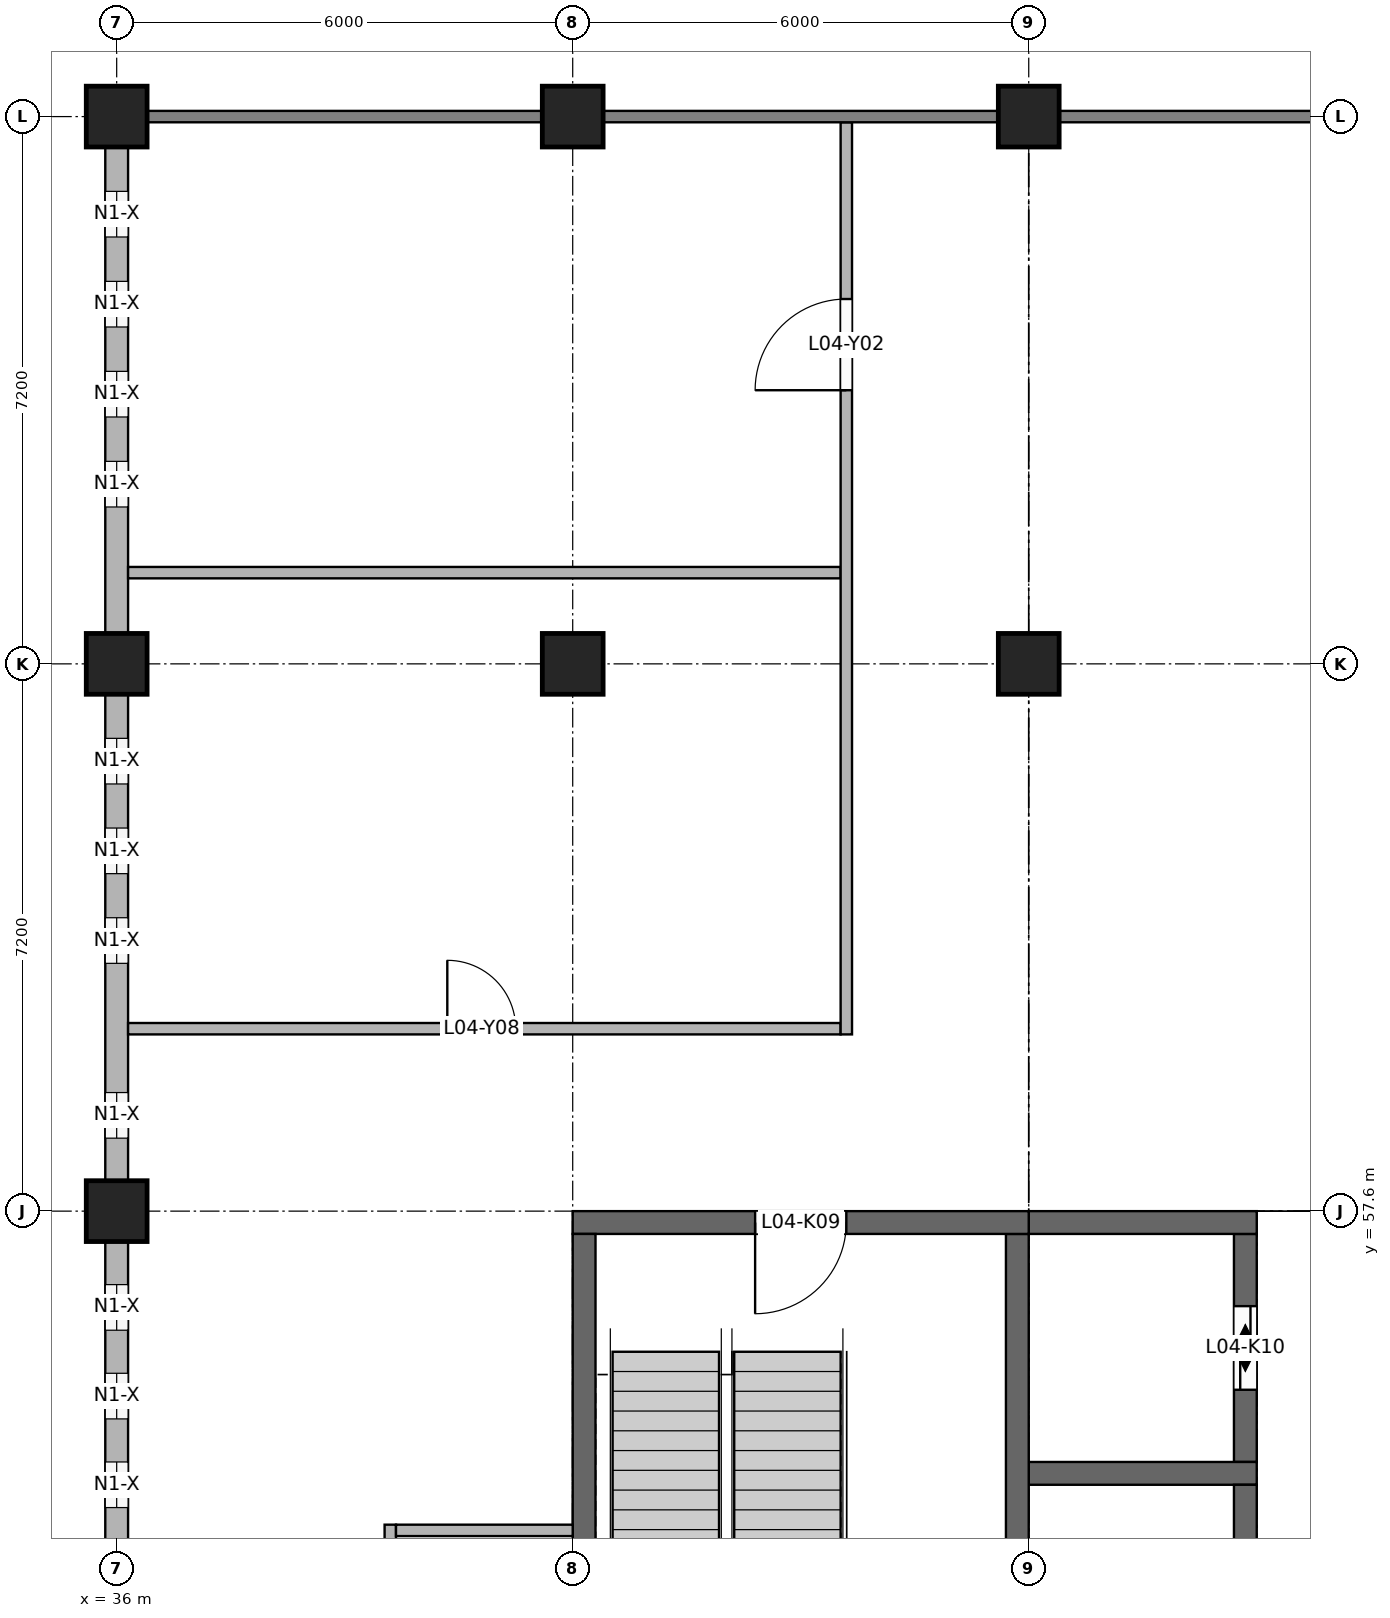
"""IFC4 building model, lengths in metres.
Left out: names, types, materials, properties, quantities, classifications, styles, units other than length and angle.
Written with IfcOpenShell. Run it as: python <this file> out.ifc"""

import sys

from ifc_helpers import new_model, si_unit, direction, frame, frame_2d, origin, origin_2d, place, context, subcontext, project, spatial, rectangle, extrude, element, fill, save


model = new_model("IFC4")
c1 = context("Model", 3, precision=1e-05, world=origin(), true_north=direction((0.0, 1.0)))
c2 = subcontext(c1, "Body", "Model", "MODEL_VIEW")
j1 = project(units=[si_unit("LENGTHUNIT", "METRE"), si_unit("PLANEANGLEUNIT", "RADIAN")], contexts=[c1])
p1 = place(None, origin())
s1 = spatial("IfcSite", under=j1, at=p1, CompositionType="ELEMENT")
p2 = place(p1, origin())
s2 = spatial("IfcBuilding", under=s1, at=p2, CompositionType="ELEMENT")
p3 = place(p2, frame((0.0, 0.0, 16.8)))
s3 = spatial("IfcBuildingStorey", under=s2, at=p3, CompositionType="ELEMENT", Elevation=16.8)
p4 = place(p3, frame((42.0, 57.45, 0.0), z_axis=(0.0, 0.0, 1.0), x_axis=(1.0, 0.0, 0.0)))
e1 = element("IfcWall", 1, at=p4, inside=s3, PredefinedType="SHEAR", context=c2, shape_type="SweptSolid", body=[
    extrude(rectangle(XDim=6.0, YDim=0.3, at=frame_2d((3.0, 0.0))), origin(), (0.0, 0.0, 1.0), 4.0),
])
p5 = place(p4, frame((2.4, 0.0, 0.0)))
e2 = element("IfcOpeningElement", 2, at=p5, cuts=e1, PredefinedType="OPENING", context=c2, shape_type="SweptSolid", body=[
    extrude(rectangle(XDim=1.2, YDim=2.1, at=frame_2d((0.6, 1.05))), frame((0.0, 0.16, 0.0), z_axis=(0.0, -1.0, 0.0), x_axis=(1.0, 0.0, 0.0)), (0.0, 0.0, 1.0), 0.32),
])
for number, where, z_axis, x_axis in (
    (3, (42.15, 50.7, 0.0), (0.0, 0.0, 1.0), (0.0, 1.0, 0.0)),
    (4, (47.85, 50.7, 0.0), (0.0, 0.0, 1.0), (0.0, 1.0, 0.0)),
):
    element("IfcWall", number, at=place(p3, frame(where, z_axis=z_axis, x_axis=x_axis)), inside=s3, PredefinedType="SHEAR", context=c2, shape_type="SweptSolid", body=[
        extrude(rectangle(XDim=6.6, YDim=0.3, at=frame_2d((3.3, 0.0))), origin(), (0.0, 0.0, 1.0), 4.0),
    ])
for number, where, z_axis, x_axis in (
    (5, (48.0, 54.15, 0.0), (0.0, 0.0, 1.0), (1.0, 0.0, 0.0)),
    (6, (48.0, 57.45, 0.0), (0.0, 0.0, 1.0), (1.0, 0.0, 0.0)),
):
    element("IfcWall", number, at=place(p3, frame(where, z_axis=z_axis, x_axis=x_axis)), inside=s3, PredefinedType="SHEAR", context=c2, shape_type="SweptSolid", body=[
        extrude(rectangle(XDim=3.0, YDim=0.3, at=frame_2d((1.5, 0.0))), origin(), (0.0, 0.0, 1.0), 4.2),
    ])
p6 = place(p3, frame((50.85, 54.3, 0.0), z_axis=(0.0, 0.0, 1.0), x_axis=(0.0, 1.0, 0.0)))
e7 = element("IfcWall", 7, at=p6, inside=s3, PredefinedType="SHEAR", context=c2, shape_type="SweptSolid", body=[
    extrude(rectangle(XDim=3.0, YDim=0.3, at=frame_2d((1.5, 0.0))), origin(), (0.0, 0.0, 1.0), 4.2),
])
p7 = place(p6, frame((0.95, 0.0, 0.0)))
e8 = element("IfcOpeningElement", 8, at=p7, cuts=e7, PredefinedType="OPENING", context=c2, shape_type="SweptSolid", body=[
    extrude(rectangle(XDim=1.1, YDim=2.1, at=frame_2d((0.55, 1.05))), frame((0.0, 0.16, 0.0), z_axis=(0.0, -1.0, 0.0), x_axis=(1.0, 0.0, 0.0)), (0.0, 0.0, 1.0), 0.32),
])
p8 = place(p3, frame((50.85, 50.7, 0.0), z_axis=(0.0, 0.0, 1.0), x_axis=(0.0, 1.0, 0.0)))
e9 = element("IfcWall", 9, at=p8, inside=s3, PredefinedType="SHEAR", context=c2, shape_type="SweptSolid", body=[
    extrude(rectangle(XDim=3.3, YDim=0.3, at=frame_2d((1.65, 0.0))), origin(), (0.0, 0.0, 1.0), 4.2),
])
p9 = place(p8, frame((0.95, 0.0, 0.0)))
e10 = element("IfcOpeningElement", 10, at=p9, cuts=e9, PredefinedType="OPENING", context=c2, shape_type="SweptSolid", body=[
    extrude(rectangle(XDim=1.1, YDim=2.1, at=frame_2d((0.55, 1.05))), frame((0.0, 0.16, 0.0), z_axis=(0.0, -1.0, 0.0), x_axis=(1.0, 0.0, 0.0)), (0.0, 0.0, 1.0), 0.32),
])
for number, where, z_axis, x_axis in (
    (11, (36.0, 57.6, 0.0), (0.0, 0.0, 1.0), (1.0, 0.0, 0.0)),
    (12, (36.0, 64.8, 0.0), (0.0, 0.0, 1.0), (1.0, 0.0, 0.0)),
    (13, (42.0, 64.8, 0.0), (0.0, 0.0, 1.0), (1.0, 0.0, 0.0)),
    (14, (48.0, 64.8, 0.0), (0.0, 0.0, 1.0), (1.0, 0.0, 0.0)),
    (15, (36.0, 72.0, 0.0), (0.0, 0.0, 1.0), (1.0, 0.0, 0.0)),
    (16, (42.0, 72.0, 0.0), (0.0, 0.0, 1.0), (1.0, 0.0, 0.0)),
    (17, (48.0, 72.0, 0.0), (0.0, 0.0, 1.0), (1.0, 0.0, 0.0)),
):
    element("IfcColumn", number, at=place(p3, frame(where, z_axis=z_axis, x_axis=x_axis)), inside=s3, PredefinedType="COLUMN", context=c2, shape_type="SweptSolid", body=[
        extrude(rectangle(XDim=0.8, YDim=0.8, at=origin_2d()), origin(), (0.0, 0.0, 1.0), 4.0),
    ])
p10 = place(p3, frame((36.0, 50.8, 0.0), z_axis=(0.0, 0.0, 1.0), x_axis=(0.0, 1.0, 0.0)))
e18 = element("IfcWall", 18, at=p10, inside=s3, PredefinedType="SOLIDWALL", context=c2, shape_type="SweptSolid", body=[
    extrude(rectangle(XDim=6.4, YDim=0.3, at=frame_2d((3.2, 0.0))), origin(), (0.0, 0.0, 1.0), 3.1),
])
p11 = place(p10, frame((0.567, 0.0, 0.9)))
e19 = element("IfcOpeningElement", 19, at=p11, cuts=e18, PredefinedType="OPENING", context=c2, shape_type="SweptSolid", body=[
    extrude(rectangle(XDim=0.6, YDim=1.9, at=frame_2d((0.3, 0.95))), frame((0.0, 0.16, 0.0), z_axis=(0.0, -1.0, 0.0), x_axis=(1.0, 0.0, 0.0)), (0.0, 0.0, 1.0), 0.32),
])
p12 = place(p10, frame((1.733, 0.0, 0.9)))
e20 = element("IfcOpeningElement", 20, at=p12, cuts=e18, PredefinedType="OPENING", context=c2, shape_type="SweptSolid", body=[
    extrude(rectangle(XDim=0.6, YDim=1.9, at=frame_2d((0.3, 0.95))), frame((0.0, 0.16, 0.0), z_axis=(0.0, -1.0, 0.0), x_axis=(1.0, 0.0, 0.0)), (0.0, 0.0, 1.0), 0.32),
])
p13 = place(p10, frame((2.9, 0.0, 0.9)))
e21 = element("IfcOpeningElement", 21, at=p13, cuts=e18, PredefinedType="OPENING", context=c2, shape_type="SweptSolid", body=[
    extrude(rectangle(XDim=0.6, YDim=1.9, at=frame_2d((0.3, 0.95))), frame((0.0, 0.16, 0.0), z_axis=(0.0, -1.0, 0.0), x_axis=(1.0, 0.0, 0.0)), (0.0, 0.0, 1.0), 0.32),
])
p14 = place(p10, frame((4.067, 0.0, 0.9)))
e22 = element("IfcOpeningElement", 22, at=p14, cuts=e18, PredefinedType="OPENING", context=c2, shape_type="SweptSolid", body=[
    extrude(rectangle(XDim=0.6, YDim=1.9, at=frame_2d((0.3, 0.95))), frame((0.0, 0.16, 0.0), z_axis=(0.0, -1.0, 0.0), x_axis=(1.0, 0.0, 0.0)), (0.0, 0.0, 1.0), 0.32),
])
p15 = place(p10, frame((5.233, 0.0, 0.9)))
e23 = element("IfcOpeningElement", 23, at=p15, cuts=e18, PredefinedType="OPENING", context=c2, shape_type="SweptSolid", body=[
    extrude(rectangle(XDim=0.6, YDim=1.9, at=frame_2d((0.3, 0.95))), frame((0.0, 0.16, 0.0), z_axis=(0.0, -1.0, 0.0), x_axis=(1.0, 0.0, 0.0)), (0.0, 0.0, 1.0), 0.32),
])
p16 = place(p3, frame((36.0, 58.0, 0.0), z_axis=(0.0, 0.0, 1.0), x_axis=(0.0, 1.0, 0.0)))
e24 = element("IfcWall", 24, at=p16, inside=s3, PredefinedType="SOLIDWALL", context=c2, shape_type="SweptSolid", body=[
    extrude(rectangle(XDim=6.4, YDim=0.3, at=frame_2d((3.2, 0.0))), origin(), (0.0, 0.0, 1.0), 3.1),
])
p17 = place(p16, frame((0.56, 0.0, 0.9)))
e25 = element("IfcOpeningElement", 25, at=p17, cuts=e24, PredefinedType="OPENING", context=c2, shape_type="SweptSolid", body=[
    extrude(rectangle(XDim=0.6, YDim=1.9, at=frame_2d((0.3, 0.95))), frame((0.0, 0.16, 0.0), z_axis=(0.0, -1.0, 0.0), x_axis=(1.0, 0.0, 0.0)), (0.0, 0.0, 1.0), 0.32),
])
p18 = place(p16, frame((2.86, 0.0, 0.9)))
e26 = element("IfcOpeningElement", 26, at=p18, cuts=e24, PredefinedType="OPENING", context=c2, shape_type="SweptSolid", body=[
    extrude(rectangle(XDim=0.6, YDim=1.9, at=frame_2d((0.3, 0.95))), frame((0.0, 0.16, 0.0), z_axis=(0.0, -1.0, 0.0), x_axis=(1.0, 0.0, 0.0)), (0.0, 0.0, 1.0), 0.32),
])
p19 = place(p16, frame((4.04, 0.0, 0.9)))
e27 = element("IfcOpeningElement", 27, at=p19, cuts=e24, PredefinedType="OPENING", context=c2, shape_type="SweptSolid", body=[
    extrude(rectangle(XDim=0.6, YDim=1.9, at=frame_2d((0.3, 0.95))), frame((0.0, 0.16, 0.0), z_axis=(0.0, -1.0, 0.0), x_axis=(1.0, 0.0, 0.0)), (0.0, 0.0, 1.0), 0.32),
])
p20 = place(p16, frame((5.22, 0.0, 0.9)))
e28 = element("IfcOpeningElement", 28, at=p20, cuts=e24, PredefinedType="OPENING", context=c2, shape_type="SweptSolid", body=[
    extrude(rectangle(XDim=0.6, YDim=1.9, at=frame_2d((0.3, 0.95))), frame((0.0, 0.16, 0.0), z_axis=(0.0, -1.0, 0.0), x_axis=(1.0, 0.0, 0.0)), (0.0, 0.0, 1.0), 0.32),
])
p21 = place(p3, frame((36.0, 65.2, 0.0), z_axis=(0.0, 0.0, 1.0), x_axis=(0.0, 1.0, 0.0)))
e29 = element("IfcWall", 29, at=p21, inside=s3, PredefinedType="SOLIDWALL", context=c2, shape_type="SweptSolid", body=[
    extrude(rectangle(XDim=6.4, YDim=0.3, at=frame_2d((3.2, 0.0))), origin(), (0.0, 0.0, 1.0), 3.1),
])
p22 = place(p21, frame((1.664, 0.0, 0.9)))
e30 = element("IfcOpeningElement", 30, at=p22, cuts=e29, PredefinedType="OPENING", context=c2, shape_type="SweptSolid", body=[
    extrude(rectangle(XDim=0.6, YDim=1.9, at=frame_2d((0.3, 0.95))), frame((0.0, 0.16, 0.0), z_axis=(0.0, -1.0, 0.0), x_axis=(1.0, 0.0, 0.0)), (0.0, 0.0, 1.0), 0.32),
])
p23 = place(p21, frame((2.848, 0.0, 0.9)))
e31 = element("IfcOpeningElement", 31, at=p23, cuts=e29, PredefinedType="OPENING", context=c2, shape_type="SweptSolid", body=[
    extrude(rectangle(XDim=0.6, YDim=1.9, at=frame_2d((0.3, 0.95))), frame((0.0, 0.16, 0.0), z_axis=(0.0, -1.0, 0.0), x_axis=(1.0, 0.0, 0.0)), (0.0, 0.0, 1.0), 0.32),
])
p24 = place(p21, frame((4.032, 0.0, 0.9)))
e32 = element("IfcOpeningElement", 32, at=p24, cuts=e29, PredefinedType="OPENING", context=c2, shape_type="SweptSolid", body=[
    extrude(rectangle(XDim=0.6, YDim=1.9, at=frame_2d((0.3, 0.95))), frame((0.0, 0.16, 0.0), z_axis=(0.0, -1.0, 0.0), x_axis=(1.0, 0.0, 0.0)), (0.0, 0.0, 1.0), 0.32),
])
p25 = place(p21, frame((5.216, 0.0, 0.9)))
e33 = element("IfcOpeningElement", 33, at=p25, cuts=e29, PredefinedType="OPENING", context=c2, shape_type="SweptSolid", body=[
    extrude(rectangle(XDim=0.6, YDim=1.9, at=frame_2d((0.3, 0.95))), frame((0.0, 0.16, 0.0), z_axis=(0.0, -1.0, 0.0), x_axis=(1.0, 0.0, 0.0)), (0.0, 0.0, 1.0), 0.32),
])
p26 = place(p2, frame((0.0, 0.0, 12.6)))
s4 = spatial("IfcBuildingStorey", under=s2, at=p26, CompositionType="ELEMENT", Elevation=12.6)
p27 = place(p26, frame((48.0, 57.6, 0.0), z_axis=(0.0, 0.0, 1.0), x_axis=(0.0, 1.0, 0.0)))
e34 = element("IfcWall", 34, at=p27, inside=s4, PredefinedType="PARTITIONING", context=c2, shape_type="SweptSolid", body=[
    extrude(rectangle(XDim=6.7, YDim=0.2, at=frame_2d((3.35, 0.0))), origin(), (0.0, 0.0, 1.0), 8.2),
])
p28 = place(p3, frame((39.6, 50.475, 0.0), z_axis=(0.0, 0.0, 1.0), x_axis=(0.0, 1.0, 0.0)))
e35 = element("IfcWall", 35, at=p28, inside=s3, PredefinedType="PARTITIONING", context=c2, shape_type="SweptSolid", body=[
    extrude(rectangle(XDim=3.0, YDim=0.15, at=frame_2d((1.5, 0.0))), origin(), (0.0, 0.0, 1.0), 4.0),
])
p29 = place(p28, frame((0.975, 0.0, 0.0)))
e36 = element("IfcOpeningElement", 36, at=p29, cuts=e35, PredefinedType="OPENING", context=c2, shape_type="SweptSolid", body=[
    extrude(rectangle(XDim=0.9, YDim=2.1, at=frame_2d((0.45, 1.05))), frame((0.0, 0.085, 0.0), z_axis=(0.0, -1.0, 0.0), x_axis=(1.0, 0.0, 0.0)), (0.0, 0.0, 1.0), 0.17),
])
p30 = place(p3, frame((45.6, 59.925, 0.0), z_axis=(0.0, 0.0, 1.0), x_axis=(0.0, 1.0, 0.0)))
e37 = element("IfcWall", 37, at=p30, inside=s3, PredefinedType="PARTITIONING", context=c2, shape_type="SweptSolid", body=[
    extrude(rectangle(XDim=12.0, YDim=0.15, at=frame_2d((6.0, 0.0))), origin(), (0.0, 0.0, 1.0), 3.2),
])
p31 = place(p30, frame((8.475, 0.0, 0.0)))
e38 = element("IfcOpeningElement", 38, at=p31, cuts=e37, PredefinedType="OPENING", context=c2, shape_type="SweptSolid", body=[
    extrude(rectangle(XDim=1.2, YDim=2.1, at=frame_2d((0.6, 1.05))), frame((0.0, 0.085, 0.0), z_axis=(0.0, -1.0, 0.0), x_axis=(1.0, 0.0, 0.0)), (0.0, 0.0, 1.0), 0.17),
])
p32 = place(p3, frame((39.675, 53.4, 0.0), z_axis=(0.0, 0.0, 1.0), x_axis=(1.0, 0.0, 0.0)))
e39 = element("IfcWall", 39, at=p32, inside=s3, PredefinedType="PARTITIONING", context=c2, shape_type="SweptSolid", body=[
    extrude(rectangle(XDim=2.325, YDim=0.15, at=frame_2d((1.163, 0.0))), origin(), (0.0, 0.0, 1.0), 4.0),
])
p33 = place(p3, frame((36.15, 60.0, 0.0), z_axis=(0.0, 0.0, 1.0), x_axis=(1.0, 0.0, 0.0)))
e40 = element("IfcWall", 40, at=p33, inside=s3, PredefinedType="PARTITIONING", context=c2, shape_type="SweptSolid", body=[
    extrude(rectangle(XDim=9.375, YDim=0.15, at=frame_2d((4.688, 0.0))), origin(), (0.0, 0.0, 1.0), 3.1),
])
p34 = place(p33, frame((4.2, 0.0, 0.0)))
e41 = element("IfcOpeningElement", 41, at=p34, cuts=e40, PredefinedType="OPENING", context=c2, shape_type="SweptSolid", body=[
    extrude(rectangle(XDim=0.9, YDim=2.1, at=frame_2d((0.45, 1.05))), frame((0.0, 0.085, 0.0), z_axis=(0.0, -1.0, 0.0), x_axis=(1.0, 0.0, 0.0)), (0.0, 0.0, 1.0), 0.17),
])
p35 = place(p3, frame((36.15, 66.0, 0.0), z_axis=(0.0, 0.0, 1.0), x_axis=(1.0, 0.0, 0.0)))
e42 = element("IfcWall", 42, at=p35, inside=s3, PredefinedType="PARTITIONING", context=c2, shape_type="SweptSolid", body=[
    extrude(rectangle(XDim=9.375, YDim=0.15, at=frame_2d((4.688, 0.0))), origin(), (0.0, 0.0, 1.0), 3.1),
])
p36 = place(p13, origin())
e43 = element("IfcWindow", 43, at=p36, inside=s3, PartitioningType="SINGLE_PANEL", PredefinedType="WINDOW", context=c2, shape_type="SweptSolid", body=[
    extrude(rectangle(XDim=0.6, YDim=1.9, at=frame_2d((0.3, 0.95))), frame((0.0, 0.03, 0.0), z_axis=(0.0, -1.0, 0.0), x_axis=(1.0, 0.0, 0.0)), (0.0, 0.0, 1.0), 0.06),
])
fill(e21, e43)
p37 = place(p14, origin())
e44 = element("IfcWindow", 44, at=p37, inside=s3, PartitioningType="SINGLE_PANEL", PredefinedType="WINDOW", context=c2, shape_type="SweptSolid", body=[
    extrude(rectangle(XDim=0.6, YDim=1.9, at=frame_2d((0.3, 0.95))), frame((0.0, 0.03, 0.0), z_axis=(0.0, -1.0, 0.0), x_axis=(1.0, 0.0, 0.0)), (0.0, 0.0, 1.0), 0.06),
])
fill(e22, e44)
p38 = place(p15, origin())
e45 = element("IfcWindow", 45, at=p38, inside=s3, PartitioningType="SINGLE_PANEL", PredefinedType="WINDOW", context=c2, shape_type="SweptSolid", body=[
    extrude(rectangle(XDim=0.6, YDim=1.9, at=frame_2d((0.3, 0.95))), frame((0.0, 0.03, 0.0), z_axis=(0.0, -1.0, 0.0), x_axis=(1.0, 0.0, 0.0)), (0.0, 0.0, 1.0), 0.06),
])
fill(e23, e45)
p39 = place(p17, origin())
e46 = element("IfcWindow", 46, at=p39, inside=s3, PartitioningType="SINGLE_PANEL", PredefinedType="WINDOW", context=c2, shape_type="SweptSolid", body=[
    extrude(rectangle(XDim=0.6, YDim=1.9, at=frame_2d((0.3, 0.95))), frame((0.0, 0.03, 0.0), z_axis=(0.0, -1.0, 0.0), x_axis=(1.0, 0.0, 0.0)), (0.0, 0.0, 1.0), 0.06),
])
fill(e25, e46)
p40 = place(p18, origin())
e47 = element("IfcWindow", 47, at=p40, inside=s3, PartitioningType="SINGLE_PANEL", PredefinedType="WINDOW", context=c2, shape_type="SweptSolid", body=[
    extrude(rectangle(XDim=0.6, YDim=1.9, at=frame_2d((0.3, 0.95))), frame((0.0, 0.03, 0.0), z_axis=(0.0, -1.0, 0.0), x_axis=(1.0, 0.0, 0.0)), (0.0, 0.0, 1.0), 0.06),
])
fill(e26, e47)
p41 = place(p19, origin())
e48 = element("IfcWindow", 48, at=p41, inside=s3, PartitioningType="SINGLE_PANEL", PredefinedType="WINDOW", context=c2, shape_type="SweptSolid", body=[
    extrude(rectangle(XDim=0.6, YDim=1.9, at=frame_2d((0.3, 0.95))), frame((0.0, 0.03, 0.0), z_axis=(0.0, -1.0, 0.0), x_axis=(1.0, 0.0, 0.0)), (0.0, 0.0, 1.0), 0.06),
])
fill(e27, e48)
p42 = place(p20, origin())
e49 = element("IfcWindow", 49, at=p42, inside=s3, PartitioningType="SINGLE_PANEL", PredefinedType="WINDOW", context=c2, shape_type="SweptSolid", body=[
    extrude(rectangle(XDim=0.6, YDim=1.9, at=frame_2d((0.3, 0.95))), frame((0.0, 0.03, 0.0), z_axis=(0.0, -1.0, 0.0), x_axis=(1.0, 0.0, 0.0)), (0.0, 0.0, 1.0), 0.06),
])
fill(e28, e49)
p43 = place(p22, origin())
e50 = element("IfcWindow", 50, at=p43, inside=s3, PartitioningType="SINGLE_PANEL", PredefinedType="WINDOW", context=c2, shape_type="SweptSolid", body=[
    extrude(rectangle(XDim=0.6, YDim=1.9, at=frame_2d((0.3, 0.95))), frame((0.0, 0.03, 0.0), z_axis=(0.0, -1.0, 0.0), x_axis=(1.0, 0.0, 0.0)), (0.0, 0.0, 1.0), 0.06),
])
fill(e30, e50)
p44 = place(p23, origin())
e51 = element("IfcWindow", 51, at=p44, inside=s3, PartitioningType="SINGLE_PANEL", PredefinedType="WINDOW", context=c2, shape_type="SweptSolid", body=[
    extrude(rectangle(XDim=0.6, YDim=1.9, at=frame_2d((0.3, 0.95))), frame((0.0, 0.03, 0.0), z_axis=(0.0, -1.0, 0.0), x_axis=(1.0, 0.0, 0.0)), (0.0, 0.0, 1.0), 0.06),
])
fill(e31, e51)
p45 = place(p24, origin())
e52 = element("IfcWindow", 52, at=p45, inside=s3, PartitioningType="SINGLE_PANEL", PredefinedType="WINDOW", context=c2, shape_type="SweptSolid", body=[
    extrude(rectangle(XDim=0.6, YDim=1.9, at=frame_2d((0.3, 0.95))), frame((0.0, 0.03, 0.0), z_axis=(0.0, -1.0, 0.0), x_axis=(1.0, 0.0, 0.0)), (0.0, 0.0, 1.0), 0.06),
])
fill(e32, e52)
p46 = place(p25, origin())
e53 = element("IfcWindow", 53, at=p46, inside=s3, PartitioningType="SINGLE_PANEL", PredefinedType="WINDOW", context=c2, shape_type="SweptSolid", body=[
    extrude(rectangle(XDim=0.6, YDim=1.9, at=frame_2d((0.3, 0.95))), frame((0.0, 0.03, 0.0), z_axis=(0.0, -1.0, 0.0), x_axis=(1.0, 0.0, 0.0)), (0.0, 0.0, 1.0), 0.06),
])
fill(e33, e53)
p47 = place(p5, frame((1.2, 0.0, 0.0), z_axis=(0.0, 0.0, 1.0), x_axis=(-1.0, 0.0, 0.0)))
e54 = element("IfcDoor", 54, at=p47, inside=s3, OperationType="SINGLE_SWING_RIGHT", PredefinedType="DOOR", context=c2, shape_type="SweptSolid", body=[
    extrude(rectangle(XDim=1.2, YDim=2.1, at=frame_2d((0.6, 1.05))), frame((0.0, 0.025, 0.0), z_axis=(0.0, -1.0, 0.0), x_axis=(1.0, 0.0, 0.0)), (0.0, 0.0, 1.0), 0.05),
])
fill(e2, e54)
p48 = place(p7, origin())
e55 = element("IfcDoor", 55, at=p48, inside=s3, OperationType="DOUBLE_DOOR_SLIDING", PredefinedType="DOOR", context=c2, shape_type="SweptSolid", body=[
    extrude(rectangle(XDim=1.1, YDim=2.1, at=frame_2d((0.55, 1.05))), frame((0.0, 0.025, 0.0), z_axis=(0.0, -1.0, 0.0), x_axis=(1.0, 0.0, 0.0)), (0.0, 0.0, 1.0), 0.05),
])
fill(e8, e55)
p49 = place(p31, origin())
e56 = element("IfcDoor", 56, at=p49, inside=s3, OperationType="SINGLE_SWING_LEFT", PredefinedType="DOOR", context=c2, shape_type="SweptSolid", body=[
    extrude(rectangle(XDim=1.2, YDim=2.1, at=frame_2d((0.6, 1.05))), frame((0.0, 0.025, 0.0), z_axis=(0.0, -1.0, 0.0), x_axis=(1.0, 0.0, 0.0)), (0.0, 0.0, 1.0), 0.05),
])
fill(e38, e56)
p50 = place(p34, origin())
e57 = element("IfcDoor", 57, at=p50, inside=s3, OperationType="SINGLE_SWING_LEFT", PredefinedType="DOOR", context=c2, shape_type="SweptSolid", body=[
    extrude(rectangle(XDim=0.9, YDim=2.1, at=frame_2d((0.45, 1.05))), frame((0.0, 0.025, 0.0), z_axis=(0.0, -1.0, 0.0), x_axis=(1.0, 0.0, 0.0)), (0.0, 0.0, 1.0), 0.05),
])
fill(e41, e57)
save(model, sys.argv[1])
